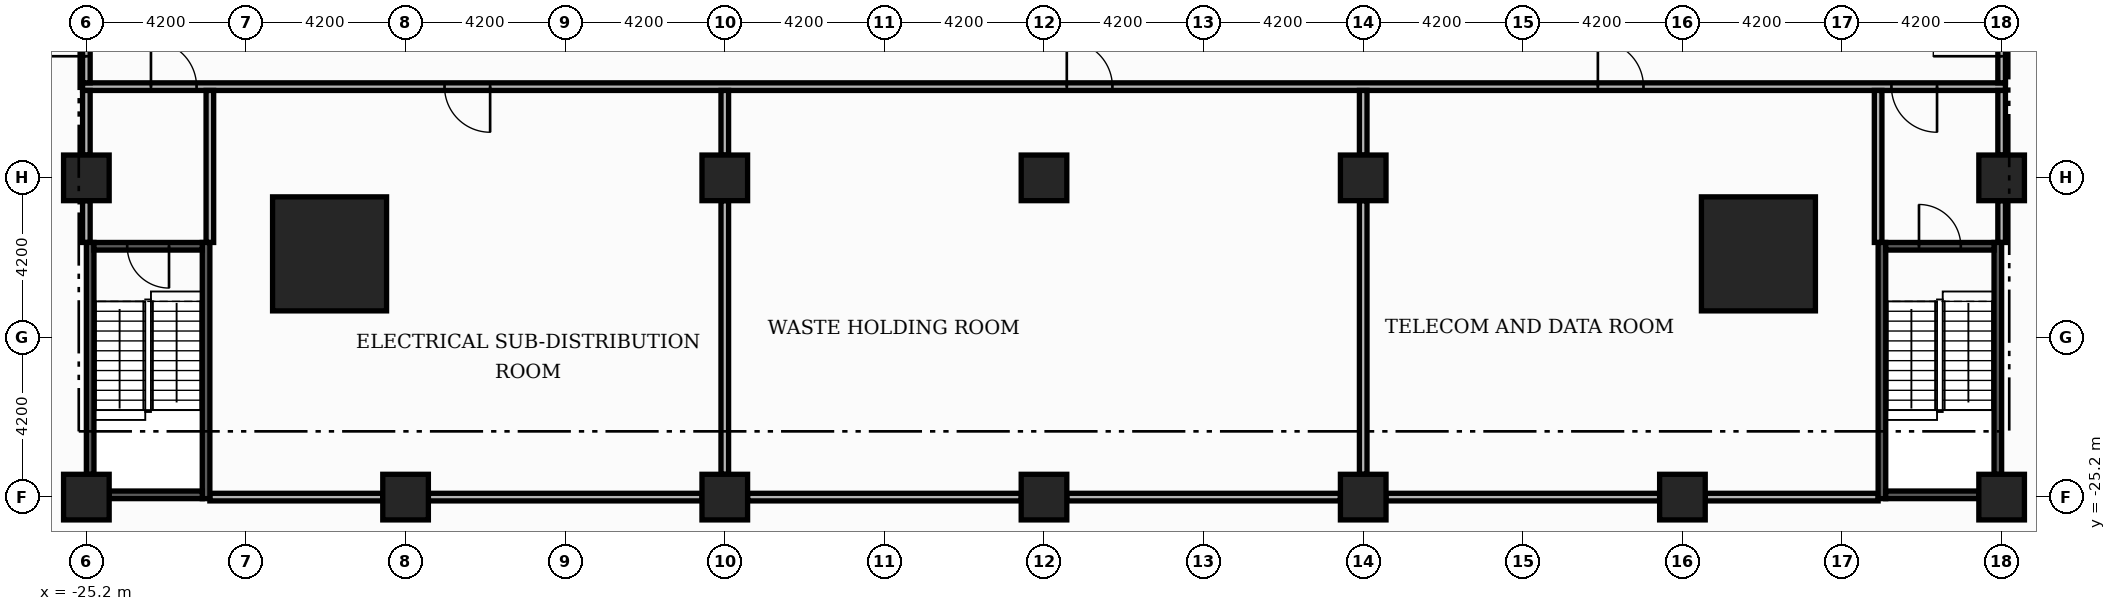
"""IFC4 building model, lengths in metres.
Left out: names, types, materials, properties, quantities, classifications, styles, units other than length and angle.
Written with IfcOpenShell. Run it as: python <this file> out.ifc"""

import sys

from ifc_helpers import new_model, si_unit, direction, frame, frame_2d, origin, origin_2d, place, context, subcontext, project, spatial, rectangle, extrude, element, fill, save


model = new_model("IFC4")
c1 = context("Model", 3, precision=1e-05, world=origin(), true_north=direction((0.0, 1.0)))
c2 = subcontext(c1, "Body", "Model", "MODEL_VIEW")
j1 = project(units=[si_unit("LENGTHUNIT", "METRE"), si_unit("PLANEANGLEUNIT", "RADIAN")], contexts=[c1])
p1 = place(None, origin())
s1 = spatial("IfcSite", under=j1, at=p1, CompositionType="ELEMENT")
p2 = place(p1, origin())
s2 = spatial("IfcBuilding", under=s1, at=p2, CompositionType="ELEMENT")
p3 = place(p2, frame((0.0, 0.0, -4.2)))
s3 = spatial("IfcBuildingStorey", under=s2, at=p3, CompositionType="ELEMENT", Elevation=-4.2)
for number, where, z_axis, x_axis in (
    (1, (18.8, -18.8, 0.0), (0.0, 0.0, 1.0), (1.0, 0.0, 0.0)),
    (2, (-18.8, -18.8, 0.0), (0.0, 0.0, 1.0), (1.0, 0.0, 0.0)),
):
    element("IfcColumn", number, at=place(p3, frame(where, z_axis=z_axis, x_axis=x_axis)), inside=s3, PredefinedType="COLUMN", context=c2, shape_type="SweptSolid", body=[
        extrude(rectangle(XDim=3.0, YDim=3.0, at=origin_2d()), origin(), (0.0, 0.0, 1.0), 4.2),
    ])
for number, where, z_axis, x_axis in (
    (3, (25.2, -16.8, 0.0), (0.0, 0.0, 1.0), (1.0, 0.0, 0.0)),
    (4, (0.0, -25.2, 0.0), (0.0, 0.0, 1.0), (1.0, 0.0, 0.0)),
    (5, (8.4, -25.2, 0.0), (0.0, 0.0, 1.0), (1.0, 0.0, 0.0)),
    (6, (16.8, -25.2, 0.0), (0.0, 0.0, 1.0), (1.0, 0.0, 0.0)),
    (7, (-8.4, -25.2, 0.0), (0.0, 0.0, 1.0), (1.0, 0.0, 0.0)),
    (8, (-16.8, -25.2, 0.0), (0.0, 0.0, 1.0), (1.0, 0.0, 0.0)),
    (9, (-25.2, -16.8, 0.0), (0.0, 0.0, 1.0), (1.0, 0.0, 0.0)),
    (10, (0.0, -16.8, 0.0), (0.0, 0.0, 1.0), (1.0, 0.0, 0.0)),
    (11, (8.4, -16.8, 0.0), (0.0, 0.0, 1.0), (1.0, 0.0, 0.0)),
    (12, (25.2, -25.2, 0.0), (0.0, 0.0, 1.0), (1.0, 0.0, 0.0)),
    (13, (-8.4, -16.8, 0.0), (0.0, 0.0, 1.0), (1.0, 0.0, 0.0)),
    (14, (-25.2, -25.2, 0.0), (0.0, 0.0, 1.0), (1.0, 0.0, 0.0)),
):
    element("IfcColumn", number, at=place(p3, frame(where, z_axis=z_axis, x_axis=x_axis)), inside=s3, PredefinedType="COLUMN", context=c2, shape_type="SweptSolid", body=[
        extrude(rectangle(XDim=1.2, YDim=1.2, at=origin_2d()), origin(), (0.0, 0.0, 1.0), 4.2),
    ])
p4 = place(p3, frame((-21.95, -25.2, 0.0), z_axis=(0.0, 0.0, 1.0), x_axis=(1.0, 0.0, 0.0)))
e15 = element("IfcWall", 15, at=p4, inside=s3, PredefinedType="PARTITIONING", context=c2, shape_type="SweptSolid", body=[
    extrude(rectangle(XDim=4.55, YDim=0.2, at=frame_2d((2.275, 0.0))), origin(), (0.0, 0.0, 1.0), 3.78),
])
for number, where, z_axis, x_axis in (
    (16, (-16.2, -25.2, 0.0), (0.0, 0.0, 1.0), (1.0, 0.0, 0.0)),
    (17, (-7.8, -25.2, 0.0), (0.0, 0.0, 1.0), (1.0, 0.0, 0.0)),
    (18, (0.6, -25.2, 0.0), (0.0, 0.0, 1.0), (1.0, 0.0, 0.0)),
    (19, (9.0, -25.2, 0.0), (0.0, 0.0, 1.0), (1.0, 0.0, 0.0)),
):
    element("IfcWall", number, at=place(p3, frame(where, z_axis=z_axis, x_axis=x_axis)), inside=s3, PredefinedType="PARTITIONING", context=c2, shape_type="SweptSolid", body=[
        extrude(rectangle(XDim=7.2, YDim=0.2, at=frame_2d((3.6, 0.0))), origin(), (0.0, 0.0, 1.0), 3.78),
    ])
p5 = place(p3, frame((17.4, -25.2, 0.0), z_axis=(0.0, 0.0, 1.0), x_axis=(1.0, 0.0, 0.0)))
e20 = element("IfcWall", 20, at=p5, inside=s3, PredefinedType="PARTITIONING", context=c2, shape_type="SweptSolid", body=[
    extrude(rectangle(XDim=4.55, YDim=0.2, at=frame_2d((2.275, 0.0))), origin(), (0.0, 0.0, 1.0), 3.78),
])
p6 = place(p3, frame((-25.3, -14.4, 0.0), z_axis=(0.0, 0.0, 1.0), x_axis=(1.0, 0.0, 0.0)))
e21 = element("IfcWall", 21, at=p6, inside=s3, PredefinedType="PARTITIONING", context=c2, shape_type="SweptSolid", body=[
    extrude(rectangle(XDim=50.6, YDim=0.2, at=frame_2d((25.3, 0.0))), origin(), (0.0, 0.0, 1.0), 3.78),
])
p7 = place(p6, frame((1.8, 0.0, 0.0)))
e22 = element("IfcOpeningElement", 22, at=p7, cuts=e21, PredefinedType="OPENING", context=c2, shape_type="SweptSolid", body=[
    extrude(rectangle(XDim=1.2, YDim=2.2, at=frame_2d((0.6, 1.1))), frame((0.0, 0.11, 0.0), z_axis=(0.0, -1.0, 0.0), x_axis=(1.0, 0.0, 0.0)), (0.0, 0.0, 1.0), 0.22),
])
p8 = place(p6, frame((9.525, 0.0, 0.0)))
e23 = element("IfcOpeningElement", 23, at=p8, cuts=e21, PredefinedType="OPENING", context=c2, shape_type="SweptSolid", body=[
    extrude(rectangle(XDim=1.2, YDim=2.2, at=frame_2d((0.6, 1.1))), frame((0.0, 0.11, 0.0), z_axis=(0.0, -1.0, 0.0), x_axis=(1.0, 0.0, 0.0)), (0.0, 0.0, 1.0), 0.22),
])
p9 = place(p6, frame((25.9, 0.0, 0.0)))
e24 = element("IfcOpeningElement", 24, at=p9, cuts=e21, PredefinedType="OPENING", context=c2, shape_type="SweptSolid", body=[
    extrude(rectangle(XDim=1.2, YDim=2.2, at=frame_2d((0.6, 1.1))), frame((0.0, 0.11, 0.0), z_axis=(0.0, -1.0, 0.0), x_axis=(1.0, 0.0, 0.0)), (0.0, 0.0, 1.0), 0.22),
])
p10 = place(p6, frame((39.875, 0.0, 0.0)))
e25 = element("IfcOpeningElement", 25, at=p10, cuts=e21, PredefinedType="OPENING", context=c2, shape_type="SweptSolid", body=[
    extrude(rectangle(XDim=1.2, YDim=2.2, at=frame_2d((0.6, 1.1))), frame((0.0, 0.11, 0.0), z_axis=(0.0, -1.0, 0.0), x_axis=(1.0, 0.0, 0.0)), (0.0, 0.0, 1.0), 0.22),
])
p11 = place(p6, frame((47.6, 0.0, 0.0)))
e26 = element("IfcOpeningElement", 26, at=p11, cuts=e21, PredefinedType="OPENING", context=c2, shape_type="SweptSolid", body=[
    extrude(rectangle(XDim=1.2, YDim=2.2, at=frame_2d((0.6, 1.1))), frame((0.0, 0.11, 0.0), z_axis=(0.0, -1.0, 0.0), x_axis=(1.0, 0.0, 0.0)), (0.0, 0.0, 1.0), 0.22),
])
p12 = place(p3, frame((-25.2, -18.5, 0.0), z_axis=(0.0, 0.0, 1.0), x_axis=(0.0, 1.0, 0.0)))
e27 = element("IfcWall", 27, at=p12, inside=s3, PredefinedType="PARTITIONING", context=c2, shape_type="SweptSolid", body=[
    extrude(rectangle(XDim=1.1, YDim=0.2, at=frame_2d((0.55, 0.0))), origin(), (0.0, 0.0, 1.0), 3.78),
])
p13 = place(p3, frame((-25.2, -16.2, 0.0), z_axis=(0.0, 0.0, 1.0), x_axis=(0.0, 1.0, 0.0)))
e28 = element("IfcWall", 28, at=p13, inside=s3, PredefinedType="PARTITIONING", context=c2, shape_type="SweptSolid", body=[
    extrude(rectangle(XDim=1.7, YDim=0.2, at=frame_2d((0.85, 0.0))), origin(), (0.0, 0.0, 1.0), 3.78),
])
p14 = place(p3, frame((-25.2, -14.3, 0.0), z_axis=(0.0, 0.0, 1.0), x_axis=(0.0, 1.0, 0.0)))
e29 = element("IfcWall", 29, at=p14, inside=s3, PredefinedType="PARTITIONING", context=c2, shape_type="SweptSolid", body=[
    extrude(rectangle(XDim=3.2, YDim=0.2, at=frame_2d((1.6, 0.0))), origin(), (0.0, 0.0, 1.0), 3.78),
])
p15 = place(p14, frame((0.7, 0.0, 0.0)))
e30 = element("IfcOpeningElement", 30, at=p15, cuts=e29, PredefinedType="OPENING", context=c2, shape_type="SweptSolid", body=[
    extrude(rectangle(XDim=1.8, YDim=2.2, at=frame_2d((0.9, 1.1))), frame((0.0, 0.11, 0.0), z_axis=(0.0, -1.0, 0.0), x_axis=(1.0, 0.0, 0.0)), (0.0, 0.0, 1.0), 0.22),
])
p16 = place(p3, frame((-21.95, -18.5, 0.0), z_axis=(0.0, 0.0, 1.0), x_axis=(0.0, 1.0, 0.0)))
e31 = element("IfcWall", 31, at=p16, inside=s3, PredefinedType="PARTITIONING", context=c2, shape_type="SweptSolid", body=[
    extrude(rectangle(XDim=4.0, YDim=0.2, at=frame_2d((2.0, 0.0))), origin(), (0.0, 0.0, 1.0), 3.78),
])
p17 = place(p3, frame((-8.4, -24.6, 0.0), z_axis=(0.0, 0.0, 1.0), x_axis=(0.0, 1.0, 0.0)))
e32 = element("IfcWall", 32, at=p17, inside=s3, PredefinedType="PARTITIONING", context=c2, shape_type="SweptSolid", body=[
    extrude(rectangle(XDim=7.2, YDim=0.2, at=frame_2d((3.6, 0.0))), origin(), (0.0, 0.0, 1.0), 3.78),
])
p18 = place(p3, frame((-8.4, -16.2, 0.0), z_axis=(0.0, 0.0, 1.0), x_axis=(0.0, 1.0, 0.0)))
e33 = element("IfcWall", 33, at=p18, inside=s3, PredefinedType="PARTITIONING", context=c2, shape_type="SweptSolid", body=[
    extrude(rectangle(XDim=1.7, YDim=0.2, at=frame_2d((0.85, 0.0))), origin(), (0.0, 0.0, 1.0), 3.78),
])
p19 = place(p3, frame((8.4, -24.6, 0.0), z_axis=(0.0, 0.0, 1.0), x_axis=(0.0, 1.0, 0.0)))
e34 = element("IfcWall", 34, at=p19, inside=s3, PredefinedType="PARTITIONING", context=c2, shape_type="SweptSolid", body=[
    extrude(rectangle(XDim=7.2, YDim=0.2, at=frame_2d((3.6, 0.0))), origin(), (0.0, 0.0, 1.0), 3.78),
])
p20 = place(p3, frame((8.4, -16.2, 0.0), z_axis=(0.0, 0.0, 1.0), x_axis=(0.0, 1.0, 0.0)))
e35 = element("IfcWall", 35, at=p20, inside=s3, PredefinedType="PARTITIONING", context=c2, shape_type="SweptSolid", body=[
    extrude(rectangle(XDim=1.7, YDim=0.2, at=frame_2d((0.85, 0.0))), origin(), (0.0, 0.0, 1.0), 3.78),
])
p21 = place(p3, frame((21.95, -18.5, 0.0), z_axis=(0.0, 0.0, 1.0), x_axis=(0.0, 1.0, 0.0)))
e36 = element("IfcWall", 36, at=p21, inside=s3, PredefinedType="PARTITIONING", context=c2, shape_type="SweptSolid", body=[
    extrude(rectangle(XDim=4.0, YDim=0.2, at=frame_2d((2.0, 0.0))), origin(), (0.0, 0.0, 1.0), 3.78),
])
p22 = place(p3, frame((25.2, -18.5, 0.0), z_axis=(0.0, 0.0, 1.0), x_axis=(0.0, 1.0, 0.0)))
e37 = element("IfcWall", 37, at=p22, inside=s3, PredefinedType="PARTITIONING", context=c2, shape_type="SweptSolid", body=[
    extrude(rectangle(XDim=1.1, YDim=0.2, at=frame_2d((0.55, 0.0))), origin(), (0.0, 0.0, 1.0), 3.78),
])
p23 = place(p3, frame((25.2, -16.2, 0.0), z_axis=(0.0, 0.0, 1.0), x_axis=(0.0, 1.0, 0.0)))
e38 = element("IfcWall", 38, at=p23, inside=s3, PredefinedType="PARTITIONING", context=c2, shape_type="SweptSolid", body=[
    extrude(rectangle(XDim=1.7, YDim=0.2, at=frame_2d((0.85, 0.0))), origin(), (0.0, 0.0, 1.0), 3.78),
])
p24 = place(p3, frame((25.2, -14.3, 0.0), z_axis=(0.0, 0.0, 1.0), x_axis=(0.0, 1.0, 0.0)))
e39 = element("IfcWall", 39, at=p24, inside=s3, PredefinedType="PARTITIONING", context=c2, shape_type="SweptSolid", body=[
    extrude(rectangle(XDim=3.2, YDim=0.2, at=frame_2d((1.6, 0.0))), origin(), (0.0, 0.0, 1.0), 3.78),
])
p25 = place(p24, frame((0.7, 0.0, 0.0)))
e40 = element("IfcOpeningElement", 40, at=p25, cuts=e39, PredefinedType="OPENING", context=c2, shape_type="SweptSolid", body=[
    extrude(rectangle(XDim=1.8, YDim=2.2, at=frame_2d((0.9, 1.1))), frame((0.0, 0.11, 0.0), z_axis=(0.0, -1.0, 0.0), x_axis=(1.0, 0.0, 0.0)), (0.0, 0.0, 1.0), 0.22),
])
p26 = place(p3, frame((22.05, -25.24, 0.0), z_axis=(0.0, 0.0, 1.0), x_axis=(0.0, 1.0, 0.0)))
e41 = element("IfcWall", 41, at=p26, inside=s3, PredefinedType="SOLIDWALL", context=c2, shape_type="SweptSolid", body=[
    extrude(rectangle(XDim=6.74, YDim=0.2, at=frame_2d((3.37, 0.0))), origin(), (0.0, 0.0, 1.0), 3.78),
])
p27 = place(p3, frame((25.1, -24.6, 0.0), z_axis=(0.0, 0.0, 1.0), x_axis=(0.0, 1.0, 0.0)))
e42 = element("IfcWall", 42, at=p27, inside=s3, PredefinedType="SOLIDWALL", context=c2, shape_type="SweptSolid", body=[
    extrude(rectangle(XDim=6.1, YDim=0.2, at=frame_2d((3.05, 0.0))), origin(), (0.0, 0.0, 1.0), 3.78),
])
p28 = place(p3, frame((22.15, -25.14, 0.0), z_axis=(0.0, 0.0, 1.0), x_axis=(1.0, 0.0, 0.0)))
e43 = element("IfcWall", 43, at=p28, inside=s3, PredefinedType="SOLIDWALL", context=c2, shape_type="SweptSolid", body=[
    extrude(rectangle(XDim=2.45, YDim=0.2, at=frame_2d((1.225, 0.0))), origin(), (0.0, 0.0, 1.0), 3.78),
])
p29 = place(p3, frame((22.15, -18.6, 0.0), z_axis=(0.0, 0.0, 1.0), x_axis=(1.0, 0.0, 0.0)))
e44 = element("IfcWall", 44, at=p29, inside=s3, PredefinedType="SOLIDWALL", context=c2, shape_type="SweptSolid", body=[
    extrude(rectangle(XDim=2.85, YDim=0.2, at=frame_2d((1.425, 0.0))), origin(), (0.0, 0.0, 1.0), 3.78),
])
p30 = place(p29, frame((0.875, 0.0, 0.0)))
e45 = element("IfcOpeningElement", 45, at=p30, cuts=e44, PredefinedType="OPENING", context=c2, shape_type="SweptSolid", body=[
    extrude(rectangle(XDim=1.1, YDim=2.2, at=frame_2d((0.55, 1.1))), frame((0.0, 0.11, 0.0), z_axis=(0.0, -1.0, 0.0), x_axis=(1.0, 0.0, 0.0)), (0.0, 0.0, 1.0), 0.22),
])
p31 = place(p3, frame((-25.1, -24.6, 0.0), z_axis=(0.0, 0.0, 1.0), x_axis=(0.0, 1.0, 0.0)))
e46 = element("IfcWall", 46, at=p31, inside=s3, PredefinedType="SOLIDWALL", context=c2, shape_type="SweptSolid", body=[
    extrude(rectangle(XDim=6.1, YDim=0.2, at=frame_2d((3.05, 0.0))), origin(), (0.0, 0.0, 1.0), 3.78),
])
p32 = place(p3, frame((-22.05, -25.24, 0.0), z_axis=(0.0, 0.0, 1.0), x_axis=(0.0, 1.0, 0.0)))
e47 = element("IfcWall", 47, at=p32, inside=s3, PredefinedType="SOLIDWALL", context=c2, shape_type="SweptSolid", body=[
    extrude(rectangle(XDim=6.74, YDim=0.2, at=frame_2d((3.37, 0.0))), origin(), (0.0, 0.0, 1.0), 3.78),
])
p33 = place(p3, frame((-24.6, -25.14, 0.0), z_axis=(0.0, 0.0, 1.0), x_axis=(1.0, 0.0, 0.0)))
e48 = element("IfcWall", 48, at=p33, inside=s3, PredefinedType="SOLIDWALL", context=c2, shape_type="SweptSolid", body=[
    extrude(rectangle(XDim=2.45, YDim=0.2, at=frame_2d((1.225, 0.0))), origin(), (0.0, 0.0, 1.0), 3.78),
])
p34 = place(p3, frame((-25.0, -18.6, 0.0), z_axis=(0.0, 0.0, 1.0), x_axis=(1.0, 0.0, 0.0)))
e49 = element("IfcWall", 49, at=p34, inside=s3, PredefinedType="SOLIDWALL", context=c2, shape_type="SweptSolid", body=[
    extrude(rectangle(XDim=2.85, YDim=0.2, at=frame_2d((1.425, 0.0))), origin(), (0.0, 0.0, 1.0), 3.78),
])
p35 = place(p34, frame((0.875, 0.0, 0.0)))
e50 = element("IfcOpeningElement", 50, at=p35, cuts=e49, PredefinedType="OPENING", context=c2, shape_type="SweptSolid", body=[
    extrude(rectangle(XDim=1.1, YDim=2.2, at=frame_2d((0.55, 1.1))), frame((0.0, 0.11, 0.0), z_axis=(0.0, -1.0, 0.0), x_axis=(1.0, 0.0, 0.0)), (0.0, 0.0, 1.0), 0.22),
])
p36 = place(p7, origin())
e51 = element("IfcDoor", 51, at=p36, inside=s3, OperationType="SINGLE_SWING_LEFT", PredefinedType="DOOR", context=c2, shape_type="SweptSolid", body=[
    extrude(rectangle(XDim=1.2, YDim=2.2, at=frame_2d((0.6, 1.1))), frame((0.0, 0.025, 0.0), z_axis=(0.0, -1.0, 0.0), x_axis=(1.0, 0.0, 0.0)), (0.0, 0.0, 1.0), 0.05),
])
fill(e22, e51)
p37 = place(p8, origin())
e52 = element("IfcDoor", 52, at=p37, inside=s3, OperationType="SINGLE_SWING_RIGHT", PredefinedType="DOOR", context=c2, shape_type="SweptSolid", body=[
    extrude(rectangle(XDim=1.2, YDim=2.2, at=frame_2d((0.6, 1.1))), frame((0.0, 0.025, 0.0), z_axis=(0.0, -1.0, 0.0), x_axis=(1.0, 0.0, 0.0)), (0.0, 0.0, 1.0), 0.05),
])
fill(e23, e52)
p38 = place(p9, origin())
e53 = element("IfcDoor", 53, at=p38, inside=s3, OperationType="SINGLE_SWING_LEFT", PredefinedType="DOOR", context=c2, shape_type="SweptSolid", body=[
    extrude(rectangle(XDim=1.2, YDim=2.2, at=frame_2d((0.6, 1.1))), frame((0.0, 0.025, 0.0), z_axis=(0.0, -1.0, 0.0), x_axis=(1.0, 0.0, 0.0)), (0.0, 0.0, 1.0), 0.05),
])
fill(e24, e53)
p39 = place(p10, origin())
e54 = element("IfcDoor", 54, at=p39, inside=s3, OperationType="SINGLE_SWING_LEFT", PredefinedType="DOOR", context=c2, shape_type="SweptSolid", body=[
    extrude(rectangle(XDim=1.2, YDim=2.2, at=frame_2d((0.6, 1.1))), frame((0.0, 0.025, 0.0), z_axis=(0.0, -1.0, 0.0), x_axis=(1.0, 0.0, 0.0)), (0.0, 0.0, 1.0), 0.05),
])
fill(e25, e54)
p40 = place(p11, origin())
e55 = element("IfcDoor", 55, at=p40, inside=s3, OperationType="SINGLE_SWING_RIGHT", PredefinedType="DOOR", context=c2, shape_type="SweptSolid", body=[
    extrude(rectangle(XDim=1.2, YDim=2.2, at=frame_2d((0.6, 1.1))), frame((0.0, 0.025, 0.0), z_axis=(0.0, -1.0, 0.0), x_axis=(1.0, 0.0, 0.0)), (0.0, 0.0, 1.0), 0.05),
])
fill(e26, e55)
p41 = place(p15, origin())
e56 = element("IfcDoor", 56, at=p41, inside=s3, OperationType="DOUBLE_DOOR_SINGLE_SWING", PredefinedType="DOOR", context=c2, shape_type="SweptSolid", body=[
    extrude(rectangle(XDim=1.8, YDim=2.2, at=frame_2d((0.9, 1.1))), frame((0.0, 0.025, 0.0), z_axis=(0.0, -1.0, 0.0), x_axis=(1.0, 0.0, 0.0)), (0.0, 0.0, 1.0), 0.05),
])
fill(e30, e56)
p42 = place(p25, origin())
e57 = element("IfcDoor", 57, at=p42, inside=s3, OperationType="DOUBLE_DOOR_SINGLE_SWING", PredefinedType="DOOR", context=c2, shape_type="SweptSolid", body=[
    extrude(rectangle(XDim=1.8, YDim=2.2, at=frame_2d((0.9, 1.1))), frame((0.0, 0.025, 0.0), z_axis=(0.0, -1.0, 0.0), x_axis=(1.0, 0.0, 0.0)), (0.0, 0.0, 1.0), 0.05),
])
fill(e40, e57)
p43 = place(p30, origin())
e58 = element("IfcDoor", 58, at=p43, inside=s3, OperationType="SINGLE_SWING_LEFT", PredefinedType="DOOR", context=c2, shape_type="SweptSolid", body=[
    extrude(rectangle(XDim=1.1, YDim=2.2, at=frame_2d((0.55, 1.1))), frame((0.0, 0.025, 0.0), z_axis=(0.0, -1.0, 0.0), x_axis=(1.0, 0.0, 0.0)), (0.0, 0.0, 1.0), 0.05),
])
fill(e45, e58)
p44 = place(p35, origin())
e59 = element("IfcDoor", 59, at=p44, inside=s3, OperationType="SINGLE_SWING_RIGHT", PredefinedType="DOOR", context=c2, shape_type="SweptSolid", body=[
    extrude(rectangle(XDim=1.1, YDim=2.2, at=frame_2d((0.55, 1.1))), frame((0.0, 0.025, 0.0), z_axis=(0.0, -1.0, 0.0), x_axis=(1.0, 0.0, 0.0)), (0.0, 0.0, 1.0), 0.05),
])
fill(e50, e59)
save(model, sys.argv[1])
